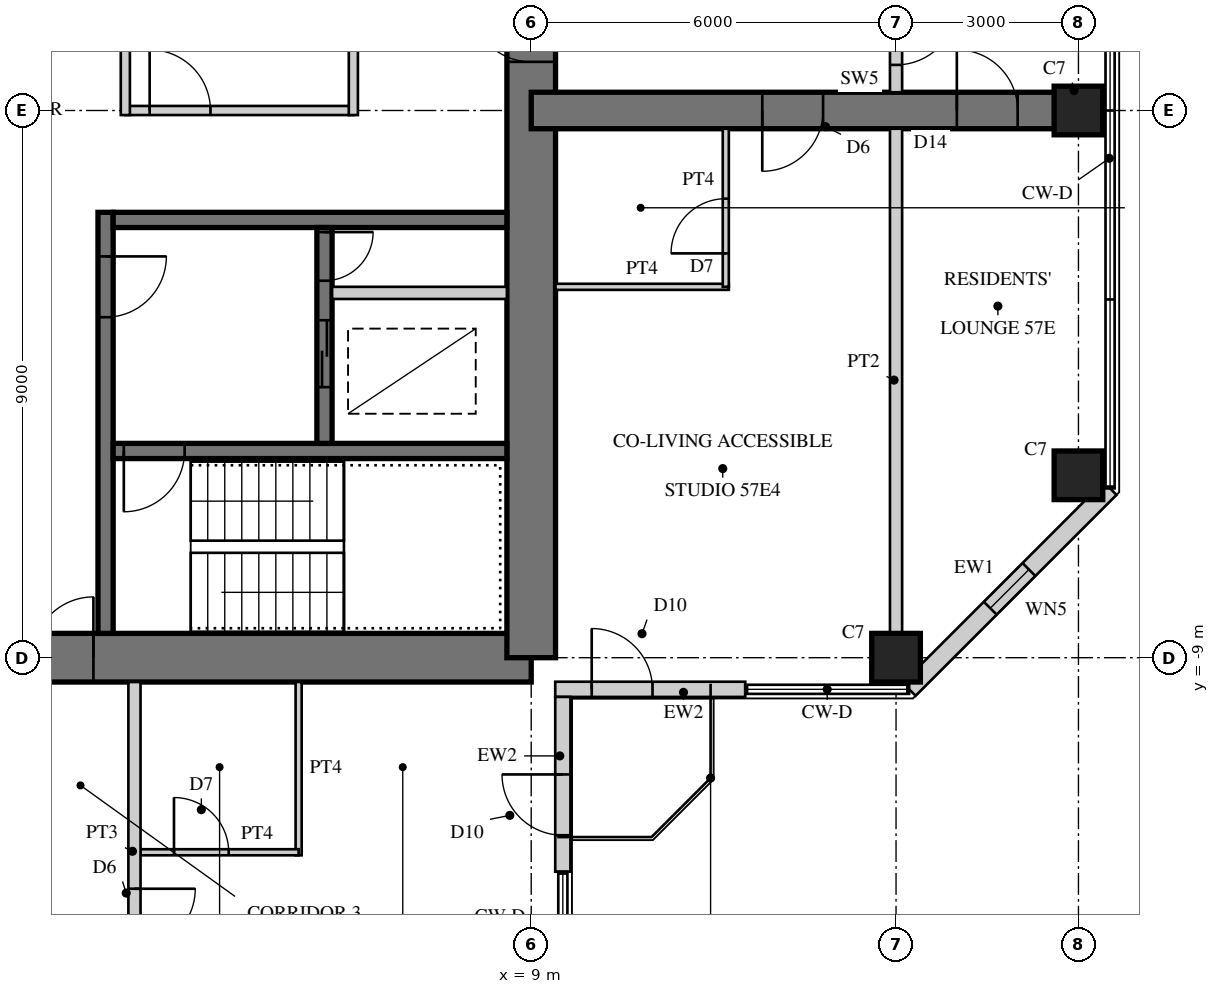
"""IFC4 building model, lengths in metres.
Left out: names, types, materials, properties, quantities, classifications, styles, units other than length and angle.
Written with IfcOpenShell. Run it as: python <this file> out.ifc"""

import sys

from ifc_helpers import new_model, si_unit, direction, frame, frame_2d, origin, origin_2d, place, context, subcontext, project, spatial, rectangle, hollow_rectangle, extrude, element, fill, save


model = new_model("IFC4")
c1 = context("Model", 3, precision=1e-05, world=origin(), true_north=direction((0.0, 1.0)))
c2 = subcontext(c1, "Body", "Model", "MODEL_VIEW")
j1 = project(units=[si_unit("LENGTHUNIT", "METRE"), si_unit("PLANEANGLEUNIT", "RADIAN")], contexts=[c1])
p1 = place(None, origin())
s1 = spatial("IfcSite", under=j1, at=p1, CompositionType="ELEMENT")
p2 = place(p1, origin())
s2 = spatial("IfcBuilding", under=s1, at=p2, CompositionType="ELEMENT")
p3 = place(p2, frame((0.0, 0.0, 225.5)))
s3 = spatial("IfcBuildingStorey", under=s2, at=p3, CompositionType="ELEMENT", Elevation=225.5)
p4 = place(p3, frame((-9.0, -9.0, 0.0), z_axis=(0.0, 0.0, 1.0), x_axis=(1.0, 0.0, 0.0)))
e1 = element("IfcWall", 1, at=p4, inside=s3, PredefinedType="SHEAR", context=c2, shape_type="SweptSolid", body=[
    extrude(rectangle(XDim=18.0, YDim=0.8, at=frame_2d((9.0, 0.0))), origin(), (0.0, 0.0, 1.0), 3.4),
])
p5 = place(p4, frame((9.8, 0.0, 0.0)))
e2 = element("IfcOpeningElement", 2, at=p5, cuts=e1, PredefinedType="OPENING", context=c2, shape_type="SweptSolid", body=[
    extrude(rectangle(XDim=1.0, YDim=2.4, at=frame_2d((0.5, 1.2))), frame((0.0, 0.41, 0.0), z_axis=(0.0, -1.0, 0.0), x_axis=(1.0, 0.0, 0.0)), (0.0, 0.0, 1.0), 0.82),
])
p6 = place(p3, frame((9.0, -9.0, 0.0), z_axis=(0.0, 0.0, 1.0), x_axis=(0.0, 1.0, 0.0)))
e3 = element("IfcWall", 3, at=p6, inside=s3, PredefinedType="SHEAR", context=c2, shape_type="SweptSolid", body=[
    extrude(rectangle(XDim=18.0, YDim=0.8, at=frame_2d((9.0, 0.0))), origin(), (0.0, 0.0, 1.0), 3.4),
])
p7 = place(p6, frame((9.8, 0.0, 0.0)))
e4 = element("IfcOpeningElement", 4, at=p7, cuts=e3, PredefinedType="OPENING", context=c2, shape_type="SweptSolid", body=[
    extrude(rectangle(XDim=1.0, YDim=2.4, at=frame_2d((0.5, 1.2))), frame((0.0, 0.41, 0.0), z_axis=(0.0, -1.0, 0.0), x_axis=(1.0, 0.0, 0.0)), (0.0, 0.0, 1.0), 0.82),
])
p8 = place(p3, frame((2.0, -1.675, 0.0), z_axis=(0.0, 0.0, 1.0), x_axis=(0.0, -1.0, 0.0)))
e5 = element("IfcWall", 5, at=p8, inside=s3, PredefinedType="SHEAR", context=c2, shape_type="SweptSolid", body=[
    extrude(rectangle(XDim=6.925, YDim=0.25, at=frame_2d((3.462, 0.0))), origin(), (0.0, 0.0, 1.0), 3.4),
])
p9 = place(p8, frame((0.725, 0.0, 0.0)))
e6 = element("IfcOpeningElement", 6, at=p9, cuts=e5, PredefinedType="OPENING", context=c2, shape_type="SweptSolid", body=[
    extrude(rectangle(XDim=1.0, YDim=2.1, at=frame_2d((0.5, 1.05))), frame((0.0, 0.135, 0.0), z_axis=(0.0, -1.0, 0.0), x_axis=(1.0, 0.0, 0.0)), (0.0, 0.0, 1.0), 0.27),
])
p10 = place(p3, frame((2.125, -1.8, 0.0), z_axis=(0.0, 0.0, 1.0), x_axis=(1.0, 0.0, 0.0)))
e7 = element("IfcWall", 7, at=p10, inside=s3, PredefinedType="SHEAR", context=c2, shape_type="SweptSolid", body=[
    extrude(rectangle(XDim=6.475, YDim=0.25, at=frame_2d((3.238, 0.0))), origin(), (0.0, 0.0, 1.0), 3.4),
])
p11 = place(p3, frame((2.125, -5.6, 0.0), z_axis=(0.0, 0.0, 1.0), x_axis=(1.0, 0.0, 0.0)))
e8 = element("IfcWall", 8, at=p11, inside=s3, PredefinedType="SHEAR", context=c2, shape_type="SweptSolid", body=[
    extrude(rectangle(XDim=6.475, YDim=0.25, at=frame_2d((3.238, 0.0))), origin(), (0.0, 0.0, 1.0), 3.4),
])
p12 = place(p11, frame((0.175, 0.0, 0.0)))
e9 = element("IfcOpeningElement", 9, at=p12, cuts=e8, PredefinedType="OPENING", context=c2, shape_type="SweptSolid", body=[
    extrude(rectangle(XDim=1.0, YDim=2.1, at=frame_2d((0.5, 1.05))), frame((0.0, 0.135, 0.0), z_axis=(0.0, -1.0, 0.0), x_axis=(1.0, 0.0, 0.0)), (0.0, 0.0, 1.0), 0.27),
])
p13 = place(p3, frame((5.6, -1.925, 0.0), z_axis=(0.0, 0.0, 1.0), x_axis=(0.0, -1.0, 0.0)))
e10 = element("IfcWall", 10, at=p13, inside=s3, PredefinedType="SHEAR", context=c2, shape_type="SweptSolid", body=[
    extrude(rectangle(XDim=3.55, YDim=0.25, at=frame_2d((1.775, 0.0))), origin(), (0.0, 0.0, 1.0), 3.4),
])
p14 = place(p13, frame((1.525, 0.0, 0.0)))
e11 = element("IfcOpeningElement", 11, at=p14, cuts=e10, PredefinedType="OPENING", context=c2, shape_type="SweptSolid", body=[
    extrude(rectangle(XDim=1.1, YDim=2.2, at=frame_2d((0.55, 1.1))), frame((0.0, 0.135, 0.0), z_axis=(0.0, -1.0, 0.0), x_axis=(1.0, 0.0, 0.0)), (0.0, 0.0, 1.0), 0.27),
])
p15 = place(p13, frame((0.075, 0.0, 0.0)))
e12 = element("IfcOpeningElement", 12, at=p15, cuts=e10, PredefinedType="OPENING", context=c2, shape_type="SweptSolid", body=[
    extrude(rectangle(XDim=0.8, YDim=2.1, at=frame_2d((0.4, 1.05))), frame((0.0, 0.135, 0.0), z_axis=(0.0, -1.0, 0.0), x_axis=(1.0, 0.0, 0.0)), (0.0, 0.0, 1.0), 0.27),
])
p16 = place(p3, frame((5.725, -3.0, 0.0), z_axis=(0.0, 0.0, 1.0), x_axis=(1.0, 0.0, 0.0)))
e13 = element("IfcWall", 13, at=p16, inside=s3, PredefinedType="PARTITIONING", context=c2, shape_type="SweptSolid", body=[
    extrude(rectangle(XDim=2.875, YDim=0.2, at=frame_2d((1.438, 0.0))), origin(), (0.0, 0.0, 1.0), 3.4),
])
p17 = place(p3, frame((9.0, 0.0, 0.0), z_axis=(0.0, 0.0, 1.0), x_axis=(1.0, 0.0, 0.0)))
e14 = element("IfcWall", 14, at=p17, inside=s3, PredefinedType="SHEAR", context=c2, shape_type="SweptSolid", body=[
    extrude(rectangle(XDim=9.0, YDim=0.6, at=frame_2d((4.5, 0.0))), origin(), (0.0, 0.0, 1.0), 3.4),
])
p18 = place(p17, frame((3.8, 0.0, 0.0)))
e15 = element("IfcOpeningElement", 15, at=p18, cuts=e14, PredefinedType="OPENING", context=c2, shape_type="SweptSolid", body=[
    extrude(rectangle(XDim=1.0, YDim=2.15, at=frame_2d((0.5, 1.075))), frame((0.0, 0.31, 0.0), z_axis=(0.0, -1.0, 0.0), x_axis=(1.0, 0.0, 0.0)), (0.0, 0.0, 1.0), 0.62),
])
p19 = place(p17, frame((7.0, 0.0, 0.0)))
e16 = element("IfcOpeningElement", 16, at=p19, cuts=e14, PredefinedType="OPENING", context=c2, shape_type="SweptSolid", body=[
    extrude(rectangle(XDim=1.0, YDim=2.2, at=frame_2d((0.5, 1.1))), frame((0.0, 0.31, 0.0), z_axis=(0.0, -1.0, 0.0), x_axis=(1.0, 0.0, 0.0)), (0.0, 0.0, 1.0), 0.62),
])
for number, where, z_axis, x_axis in (
    (17, (15.0, -9.0, 0.0), (0.0, 0.0, 1.0), (1.0, 0.0, 0.0)),
    (18, (18.0, -6.0, 0.0), (0.0, 0.0, 1.0), (1.0, 0.0, 0.0)),
    (19, (18.0, 0.0, 0.0), (0.0, 0.0, 1.0), (1.0, 0.0, 0.0)),
):
    element("IfcColumn", number, at=place(p3, frame(where, z_axis=z_axis, x_axis=x_axis)), inside=s3, PredefinedType="COLUMN", context=c2, shape_type="SweptSolid", body=[
        extrude(rectangle(XDim=0.8, YDim=0.8, at=origin_2d()), origin(), (0.0, 0.0, 1.0), 3.4),
    ])
p20 = place(p3, frame((9.395, -9.52, 0.0), z_axis=(0.0, 0.0, 1.0), x_axis=(1.0, 0.0, 0.0)))
e20 = element("IfcWall", 20, at=p20, inside=s3, PredefinedType="SOLIDWALL", context=c2, shape_type="SweptSolid", body=[
    extrude(rectangle(XDim=3.125, YDim=0.25, at=frame_2d((1.562, 0.0))), origin(), (0.0, 0.0, 1.0), 3.22),
])
p21 = place(p20, frame((0.6, 0.0, 0.0)))
e21 = element("IfcOpeningElement", 21, at=p21, cuts=e20, PredefinedType="OPENING", context=c2, shape_type="SweptSolid", body=[
    extrude(rectangle(XDim=1.0, YDim=2.2, at=frame_2d((0.5, 1.1))), frame((0.0, 0.135, 0.0), z_axis=(0.0, -1.0, 0.0), x_axis=(1.0, 0.0, 0.0)), (0.0, 0.0, 1.0), 0.27),
])
p22 = place(p3, frame((15.215, -9.52, 0.0), z_axis=(0.0, 0.0, 1.0), x_axis=(0.707106781187, 0.707106781187, 0.0)))
e22 = element("IfcWall", 22, at=p22, inside=s3, PredefinedType="SOLIDWALL", context=c2, shape_type="SweptSolid", body=[
    extrude(rectangle(XDim=4.674, YDim=0.3, at=frame_2d((2.337, 0.0))), origin(), (0.0, 0.0, 1.0), 3.22),
])
p23 = place(p22, frame((1.887, 0.0, 0.3)))
e23 = element("IfcOpeningElement", 23, at=p23, cuts=e22, PredefinedType="OPENING", context=c2, shape_type="SweptSolid", body=[
    extrude(rectangle(XDim=0.9, YDim=2.4, at=frame_2d((0.45, 1.2))), frame((0.0, 0.16, 0.0), z_axis=(0.0, -1.0, 0.0), x_axis=(1.0, 0.0, 0.0)), (0.0, 0.0, 1.0), 0.32),
])
p24 = place(p3, frame((9.52, -12.52, 0.0), z_axis=(0.0, 0.0, 1.0), x_axis=(0.0, 1.0, 0.0)))
e24 = element("IfcWall", 24, at=p24, inside=s3, PredefinedType="SOLIDWALL", context=c2, shape_type="SweptSolid", body=[
    extrude(rectangle(XDim=2.875, YDim=0.25, at=frame_2d((1.438, 0.0))), origin(), (0.0, 0.0, 1.0), 3.22),
])
p25 = place(p24, frame((0.6, 0.0, 0.0)))
e25 = element("IfcOpeningElement", 25, at=p25, cuts=e24, PredefinedType="OPENING", context=c2, shape_type="SweptSolid", body=[
    extrude(rectangle(XDim=1.0, YDim=2.2, at=frame_2d((0.5, 1.1))), frame((0.0, 0.135, 0.0), z_axis=(0.0, -1.0, 0.0), x_axis=(1.0, 0.0, 0.0)), (0.0, 0.0, 1.0), 0.27),
])
p26 = place(p3, frame((2.325, 0.0, 0.0), z_axis=(0.0, 0.0, 1.0), x_axis=(1.0, 0.0, 0.0)))
e26 = element("IfcWall", 26, at=p26, inside=s3, PredefinedType="PARTITIONING", context=c2, shape_type="SweptSolid", body=[
    extrude(rectangle(XDim=3.75, YDim=0.15, at=frame_2d((1.875, 0.0))), origin(), (0.0, 0.0, 1.0), 3.22),
])
p27 = place(p26, frame((0.4, 0.0, 0.0)))
e27 = element("IfcOpeningElement", 27, at=p27, cuts=e26, PredefinedType="OPENING", context=c2, shape_type="SweptSolid", body=[
    extrude(rectangle(XDim=1.0, YDim=2.1, at=frame_2d((0.5, 1.05))), frame((0.0, 0.085, 0.0), z_axis=(0.0, -1.0, 0.0), x_axis=(1.0, 0.0, 0.0)), (0.0, 0.0, 1.0), 0.17),
])
for number, where, z_axis, x_axis in (
    (28, (2.325, 1.875, 0.0), (0.0, 0.0, 1.0), (0.0, -1.0, 0.0)),
    (29, (6.075, -0.075, 0.0), (0.0, 0.0, 1.0), (0.0, 1.0, 0.0)),
):
    element("IfcWall", number, at=place(p3, frame(where, z_axis=z_axis, x_axis=x_axis)), inside=s3, PredefinedType="PARTITIONING", context=c2, shape_type="SweptSolid", body=[
        extrude(rectangle(XDim=1.95, YDim=0.15, at=frame_2d((0.975, 0.0))), origin(), (0.0, 0.0, 1.0), 3.22),
    ])
p28 = place(p3, frame((9.4, -2.9, 0.0), z_axis=(0.0, 0.0, 1.0), x_axis=(1.0, 0.0, 0.0)))
e30 = element("IfcWall", 30, at=p28, inside=s3, PredefinedType="PARTITIONING", context=c2, shape_type="SweptSolid", body=[
    extrude(rectangle(XDim=2.85, YDim=0.1, at=frame_2d((1.425, 0.0))), origin(), (0.0, 0.0, 1.0), 3.22),
])
p29 = place(p3, frame((12.2, -2.9, 0.0), z_axis=(0.0, 0.0, 1.0), x_axis=(0.0, 1.0, 0.0)))
e31 = element("IfcWall", 31, at=p29, inside=s3, PredefinedType="PARTITIONING", context=c2, shape_type="SweptSolid", body=[
    extrude(rectangle(XDim=2.6, YDim=0.1, at=frame_2d((1.3, 0.0))), origin(), (0.0, 0.0, 1.0), 3.22),
])
p30 = place(p29, frame((0.55, 0.0, 0.0)))
e32 = element("IfcOpeningElement", 32, at=p30, cuts=e31, PredefinedType="OPENING", context=c2, shape_type="SweptSolid", body=[
    extrude(rectangle(XDim=0.9, YDim=2.1, at=frame_2d((0.45, 1.05))), frame((0.0, 0.06, 0.0), z_axis=(0.0, -1.0, 0.0), x_axis=(1.0, 0.0, 0.0)), (0.0, 0.0, 1.0), 0.12),
])
p31 = place(p3, frame((15.0, -8.6, 0.0), z_axis=(0.0, 0.0, 1.0), x_axis=(0.0, 1.0, 0.0)))
e33 = element("IfcWall", 33, at=p31, inside=s3, PredefinedType="SOLIDWALL", context=c2, shape_type="SweptSolid", body=[
    extrude(rectangle(XDim=8.3, YDim=0.2, at=frame_2d((4.15, 0.0))), origin(), (0.0, 0.0, 1.0), 2.52),
])
p32 = place(p3, frame((15.0, 0.3, 0.0), z_axis=(0.0, 0.0, 1.0), x_axis=(0.0, 1.0, 0.0)))
e34 = element("IfcWall", 34, at=p32, inside=s3, PredefinedType="SOLIDWALL", context=c2, shape_type="SweptSolid", body=[
    extrude(rectangle(XDim=8.3, YDim=0.2, at=frame_2d((4.15, 0.0))), origin(), (0.0, 0.0, 1.0), 2.52),
])
p33 = place(p32, frame((0.45, 0.0, 0.0)))
e35 = element("IfcOpeningElement", 35, at=p33, cuts=e34, PredefinedType="OPENING", context=c2, shape_type="SweptSolid", body=[
    extrude(rectangle(XDim=1.0, YDim=2.2, at=frame_2d((0.5, 1.1))), frame((0.0, 0.11, 0.0), z_axis=(0.0, -1.0, 0.0), x_axis=(1.0, 0.0, 0.0)), (0.0, 0.0, 1.0), 0.22),
])
p34 = place(p3, frame((5.175, -9.4, 0.0), z_axis=(0.0, 0.0, 1.0), x_axis=(0.0, -1.0, 0.0)))
e36 = element("IfcWall", 36, at=p34, inside=s3, PredefinedType="PARTITIONING", context=c2, shape_type="SweptSolid", body=[
    extrude(rectangle(XDim=2.85, YDim=0.1, at=frame_2d((1.425, 0.0))), origin(), (0.0, 0.0, 1.0), 3.22),
])
p35 = place(p3, frame((2.575, -12.2, 0.0), z_axis=(0.0, 0.0, 1.0), x_axis=(1.0, 0.0, 0.0)))
e37 = element("IfcWall", 37, at=p35, inside=s3, PredefinedType="PARTITIONING", context=c2, shape_type="SweptSolid", body=[
    extrude(rectangle(XDim=2.6, YDim=0.1, at=frame_2d((1.3, 0.0))), origin(), (0.0, 0.0, 1.0), 3.22),
])
p36 = place(p35, frame((0.55, 0.0, 0.0)))
e38 = element("IfcOpeningElement", 38, at=p36, cuts=e37, PredefinedType="OPENING", context=c2, shape_type="SweptSolid", body=[
    extrude(rectangle(XDim=0.9, YDim=2.1, at=frame_2d((0.45, 1.05))), frame((0.0, 0.06, 0.0), z_axis=(0.0, -1.0, 0.0), x_axis=(1.0, 0.0, 0.0)), (0.0, 0.0, 1.0), 0.12),
])
p37 = place(p3, frame((2.475, -9.4, 0.0), z_axis=(0.0, 0.0, 1.0), x_axis=(0.0, -1.0, 0.0)))
e39 = element("IfcWall", 39, at=p37, inside=s3, PredefinedType="SOLIDWALL", context=c2, shape_type="SweptSolid", body=[
    extrude(rectangle(XDim=5.6, YDim=0.2, at=frame_2d((2.8, 0.0))), origin(), (0.0, 0.0, 1.0), 3.22),
])
p38 = place(p37, frame((3.4, 0.0, 0.0)))
e40 = element("IfcOpeningElement", 40, at=p38, cuts=e39, PredefinedType="OPENING", context=c2, shape_type="SweptSolid", body=[
    extrude(rectangle(XDim=1.0, YDim=2.15, at=frame_2d((0.5, 1.075))), frame((0.0, 0.11, 0.0), z_axis=(0.0, -1.0, 0.0), x_axis=(1.0, 0.0, 0.0)), (0.0, 0.0, 1.0), 0.22),
])
p39 = place(p21, origin())
e41 = element("IfcDoor", 41, at=p39, inside=s3, OperationType="SINGLE_SWING_LEFT", PredefinedType="DOOR", context=c2, shape_type="SweptSolid", body=[
    extrude(hollow_rectangle(XDim=1.0, YDim=2.2, WallThickness=0.06, at=frame_2d((0.5, 1.1))), frame((0.0, 0.025, 0.0), z_axis=(0.0, -1.0, 0.0), x_axis=(1.0, 0.0, 0.0)), (0.0, 0.0, 1.0), 0.05),
    extrude(rectangle(XDim=0.879, YDim=2.079, at=frame_2d((0.5, 1.1))), frame((0.0, 0.025, 0.0), z_axis=(0.0, -1.0, 0.0), x_axis=(1.0, 0.0, 0.0)), (0.0, 0.0, 1.0), 0.05),
])
fill(e21, e41)
p40 = place(p23, origin())
e42 = element("IfcWindow", 42, at=p40, inside=s3, PartitioningType="SINGLE_PANEL", PredefinedType="WINDOW", context=c2, shape_type="SweptSolid", body=[
    extrude(hollow_rectangle(XDim=0.9, YDim=2.4, WallThickness=0.06, at=frame_2d((0.45, 1.2))), frame((0.0, 0.03, 0.0), z_axis=(0.0, -1.0, 0.0), x_axis=(1.0, 0.0, 0.0)), (0.0, 0.0, 1.0), 0.06),
    extrude(rectangle(XDim=0.779, YDim=2.279, at=frame_2d((0.45, 1.2))), frame((0.0, 0.03, 0.0), z_axis=(0.0, -1.0, 0.0), x_axis=(1.0, 0.0, 0.0)), (0.0, 0.0, 1.0), 0.06),
])
fill(e23, e42)
p41 = place(p25, origin())
e43 = element("IfcDoor", 43, at=p41, inside=s3, OperationType="SINGLE_SWING_RIGHT", PredefinedType="DOOR", context=c2, shape_type="SweptSolid", body=[
    extrude(hollow_rectangle(XDim=1.0, YDim=2.2, WallThickness=0.06, at=frame_2d((0.5, 1.1))), frame((0.0, 0.025, 0.0), z_axis=(0.0, -1.0, 0.0), x_axis=(1.0, 0.0, 0.0)), (0.0, 0.0, 1.0), 0.05),
    extrude(rectangle(XDim=0.879, YDim=2.079, at=frame_2d((0.5, 1.1))), frame((0.0, 0.025, 0.0), z_axis=(0.0, -1.0, 0.0), x_axis=(1.0, 0.0, 0.0)), (0.0, 0.0, 1.0), 0.05),
])
fill(e25, e43)
p42 = place(p27, origin())
e44 = element("IfcDoor", 44, at=p42, inside=s3, OperationType="SINGLE_SWING_LEFT", PredefinedType="DOOR", context=c2, shape_type="SweptSolid", body=[
    extrude(rectangle(XDim=1.0, YDim=2.1, at=frame_2d((0.5, 1.05))), frame((0.0, 0.025, 0.0), z_axis=(0.0, -1.0, 0.0), x_axis=(1.0, 0.0, 0.0)), (0.0, 0.0, 1.0), 0.05),
])
fill(e27, e44)
p43 = place(p30, origin())
e45 = element("IfcDoor", 45, at=p43, inside=s3, OperationType="SINGLE_SWING_LEFT", PredefinedType="DOOR", context=c2, shape_type="SweptSolid", body=[
    extrude(rectangle(XDim=0.9, YDim=2.1, at=frame_2d((0.45, 1.05))), frame((0.0, 0.025, 0.0), z_axis=(0.0, -1.0, 0.0), x_axis=(1.0, 0.0, 0.0)), (0.0, 0.0, 1.0), 0.05),
])
fill(e32, e45)
p44 = place(p33, frame((1.0, 0.0, 0.0), z_axis=(0.0, 0.0, 1.0), x_axis=(-1.0, 0.0, 0.0)))
e46 = element("IfcDoor", 46, at=p44, inside=s3, OperationType="SINGLE_SWING_LEFT", PredefinedType="DOOR", context=c2, shape_type="SweptSolid", body=[
    extrude(rectangle(XDim=1.0, YDim=2.2, at=frame_2d((0.5, 1.1))), frame((0.0, 0.025, 0.0), z_axis=(0.0, -1.0, 0.0), x_axis=(1.0, 0.0, 0.0)), (0.0, 0.0, 1.0), 0.05),
])
fill(e35, e46)
p45 = place(p36, origin())
e47 = element("IfcDoor", 47, at=p45, inside=s3, OperationType="SINGLE_SWING_LEFT", PredefinedType="DOOR", context=c2, shape_type="SweptSolid", body=[
    extrude(rectangle(XDim=0.9, YDim=2.1, at=frame_2d((0.45, 1.05))), frame((0.0, 0.025, 0.0), z_axis=(0.0, -1.0, 0.0), x_axis=(1.0, 0.0, 0.0)), (0.0, 0.0, 1.0), 0.05),
])
fill(e38, e47)
p46 = place(p38, origin())
e48 = element("IfcDoor", 48, at=p46, inside=s3, OperationType="SINGLE_SWING_LEFT", PredefinedType="DOOR", context=c2, shape_type="SweptSolid", body=[
    extrude(rectangle(XDim=1.0, YDim=2.15, at=frame_2d((0.5, 1.075))), frame((0.0, 0.025, 0.0), z_axis=(0.0, -1.0, 0.0), x_axis=(1.0, 0.0, 0.0)), (0.0, 0.0, 1.0), 0.05),
])
fill(e40, e48)
p47 = place(p18, frame((1.0, 0.0, 0.0), z_axis=(0.0, 0.0, 1.0), x_axis=(-1.0, 0.0, 0.0)))
e49 = element("IfcDoor", 49, at=p47, inside=s3, OperationType="SINGLE_SWING_RIGHT", PredefinedType="DOOR", context=c2, shape_type="SweptSolid", body=[
    extrude(rectangle(XDim=1.0, YDim=2.15, at=frame_2d((0.5, 1.075))), frame((0.0, 0.025, 0.0), z_axis=(0.0, -1.0, 0.0), x_axis=(1.0, 0.0, 0.0)), (0.0, 0.0, 1.0), 0.05),
])
fill(e15, e49)
p48 = place(p19, origin())
e50 = element("IfcDoor", 50, at=p48, inside=s3, OperationType="SINGLE_SWING_LEFT", PredefinedType="DOOR", context=c2, shape_type="SweptSolid", body=[
    extrude(rectangle(XDim=1.0, YDim=2.2, at=frame_2d((0.5, 1.1))), frame((0.0, 0.025, 0.0), z_axis=(0.0, -1.0, 0.0), x_axis=(1.0, 0.0, 0.0)), (0.0, 0.0, 1.0), 0.05),
])
fill(e16, e50)
p49 = place(p5, origin())
e51 = element("IfcDoor", 51, at=p49, inside=s3, OperationType="SINGLE_SWING_RIGHT", PredefinedType="DOOR", context=c2, shape_type="SweptSolid", body=[
    extrude(rectangle(XDim=1.0, YDim=2.4, at=frame_2d((0.5, 1.2))), frame((0.0, 0.055, 0.0), z_axis=(0.0, -1.0, 0.0), x_axis=(1.0, 0.0, 0.0)), (0.0, 0.0, 1.0), 0.05),
])
fill(e2, e51)
p50 = place(p7, origin())
e52 = element("IfcDoor", 52, at=p50, inside=s3, OperationType="SINGLE_SWING_RIGHT", PredefinedType="DOOR", context=c2, shape_type="SweptSolid", body=[
    extrude(rectangle(XDim=1.0, YDim=2.4, at=frame_2d((0.5, 1.2))), frame((0.0, 0.055, 0.0), z_axis=(0.0, -1.0, 0.0), x_axis=(1.0, 0.0, 0.0)), (0.0, 0.0, 1.0), 0.05),
])
fill(e4, e52)
p51 = place(p9, origin())
e53 = element("IfcDoor", 53, at=p51, inside=s3, OperationType="SINGLE_SWING_LEFT", PredefinedType="DOOR", context=c2, shape_type="SweptSolid", body=[
    extrude(rectangle(XDim=1.0, YDim=2.1, at=frame_2d((0.5, 1.05))), frame((0.0, 0.025, 0.0), z_axis=(0.0, -1.0, 0.0), x_axis=(1.0, 0.0, 0.0)), (0.0, 0.0, 1.0), 0.05),
])
fill(e6, e53)
p52 = place(p12, frame((1.0, 0.0, 0.0), z_axis=(0.0, 0.0, 1.0), x_axis=(-1.0, 0.0, 0.0)))
e54 = element("IfcDoor", 54, at=p52, inside=s3, OperationType="SINGLE_SWING_RIGHT", PredefinedType="DOOR", context=c2, shape_type="SweptSolid", body=[
    extrude(rectangle(XDim=1.0, YDim=2.1, at=frame_2d((0.5, 1.05))), frame((0.0, 0.025, 0.0), z_axis=(0.0, -1.0, 0.0), x_axis=(1.0, 0.0, 0.0)), (0.0, 0.0, 1.0), 0.05),
])
fill(e9, e54)
p53 = place(p14, origin())
e55 = element("IfcDoor", 55, at=p53, inside=s3, OperationType="DOUBLE_DOOR_SLIDING", PredefinedType="DOOR", context=c2, shape_type="SweptSolid", body=[
    extrude(rectangle(XDim=1.1, YDim=2.2, at=frame_2d((0.55, 1.1))), frame((0.0, 0.025, 0.0), z_axis=(0.0, -1.0, 0.0), x_axis=(1.0, 0.0, 0.0)), (0.0, 0.0, 1.0), 0.05),
])
fill(e11, e55)
p54 = place(p15, origin())
e56 = element("IfcDoor", 56, at=p54, inside=s3, OperationType="SINGLE_SWING_LEFT", PredefinedType="DOOR", context=c2, shape_type="SweptSolid", body=[
    extrude(rectangle(XDim=0.8, YDim=2.1, at=frame_2d((0.4, 1.05))), frame((0.0, 0.025, 0.0), z_axis=(0.0, -1.0, 0.0), x_axis=(1.0, 0.0, 0.0)), (0.0, 0.0, 1.0), 0.05),
])
fill(e12, e56)
save(model, sys.argv[1])
